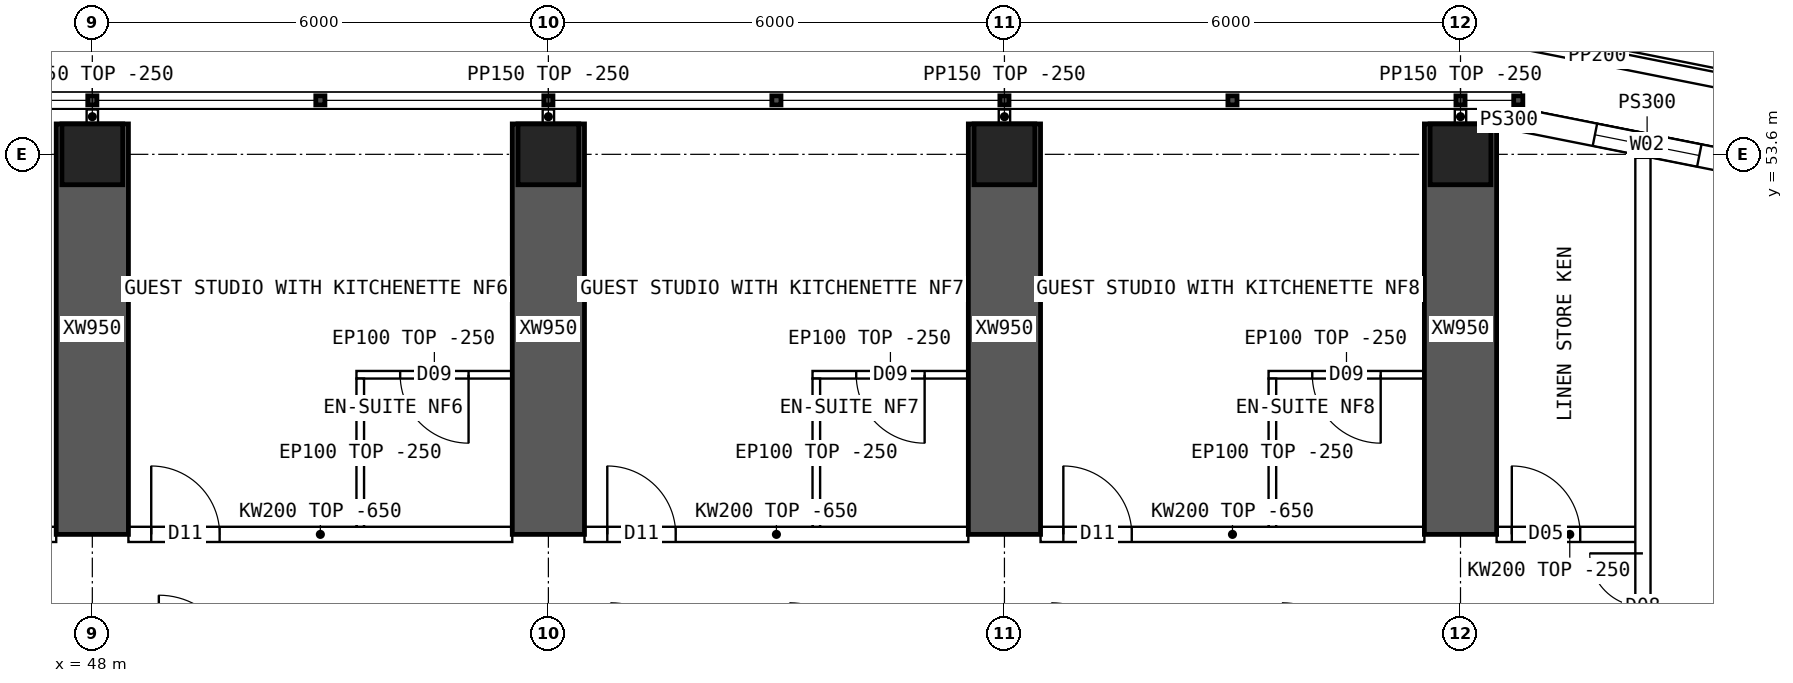
"""IFC4 building model, lengths in metres.
Left out: names, types, materials, properties, quantities, classifications, styles, units other than length and angle.
Written with IfcOpenShell. Run it as: python <this file> out.ifc"""

import sys

from ifc_helpers import new_model, si_unit, direction, frame, frame_2d, origin, origin_2d, place, context, subcontext, project, spatial, polyline, rectangle, hollow_rectangle, outline, extrude, element, fill, save


model = new_model("IFC4")
c1 = context("Model", 3, precision=1e-05, world=origin(), true_north=direction((0.0, 1.0)))
c2 = subcontext(c1, "Body", "Model", "MODEL_VIEW")
j1 = project(units=[si_unit("LENGTHUNIT", "METRE"), si_unit("PLANEANGLEUNIT", "RADIAN")], contexts=[c1])
p1 = place(None, origin())
s1 = spatial("IfcSite", under=j1, at=p1, CompositionType="ELEMENT")
p2 = place(p1, origin())
s2 = spatial("IfcBuilding", under=s1, at=p2, CompositionType="ELEMENT")
p3 = place(p2, frame((0.0, 0.0, 140.35)))
s3 = spatial("IfcBuildingStorey", under=s2, at=p3, CompositionType="ELEMENT", Elevation=140.35)
for number, where, z_axis, x_axis in (
    (1, (48.0, 53.6, 0.0), (0.0, 0.0, 1.0), (1.0, 0.0, 0.0)),
    (2, (54.0, 53.6, 0.0), (0.0, 0.0, 1.0), (1.0, 0.0, 0.0)),
    (3, (60.0, 53.6, 0.0), (0.0, 0.0, 1.0), (1.0, 0.0, 0.0)),
    (4, (66.0, 53.6, 0.0), (0.0, 0.0, 1.0), (1.0, 0.0, 0.0)),
):
    element("IfcColumn", number, at=place(p3, frame(where, z_axis=z_axis, x_axis=x_axis)), inside=s3, PredefinedType="COLUMN", context=c2, shape_type="SweptSolid", body=[
        extrude(hollow_rectangle(XDim=0.8, YDim=0.8, WallThickness=0.08, at=origin_2d()), origin(), (0.0, 0.0, 1.0), 4.5),
    ])
for number, where, z_axis, x_axis in (
    (5, (48.0, 48.6, 0.0), (0.0, 0.0, 1.0), (0.0, 1.0, 0.0)),
    (6, (54.0, 48.6, 0.0), (0.0, 0.0, 1.0), (0.0, 1.0, 0.0)),
    (7, (60.0, 48.6, 0.0), (0.0, 0.0, 1.0), (0.0, 1.0, 0.0)),
    (8, (66.0, 48.6, 0.0), (0.0, 0.0, 1.0), (0.0, 1.0, 0.0)),
):
    element("IfcWall", number, at=place(p3, frame(where, z_axis=z_axis, x_axis=x_axis)), inside=s3, PredefinedType="SHEAR", context=c2, shape_type="SweptSolid", body=[
        extrude(rectangle(XDim=5.4, YDim=0.95, at=frame_2d((2.7, 0.0))), origin(), (0.0, 0.0, 1.0), 4.5),
    ])
p4 = place(p3, frame((70.11, 53.392, 0.0), z_axis=(0.0, 0.0, 1.0), x_axis=(-0.98078325777, 0.195100490205, 0.0)))
e9 = element("IfcWall", 9, at=p4, inside=s3, PredefinedType="SOLIDWALL", context=c2, shape_type="SweptSolid", body=[
    extrude(outline(polyline([(-0.03, -0.15), (3.405, -0.15), (3.345, 0.15), (0.03, 0.15), (-0.03, -0.15)])), origin(), (0.0, 0.0, 1.0), 4.25),
])
p5 = place(p4, frame((0.988, 0.0, 0.9)))
e10 = element("IfcOpeningElement", 10, at=p5, cuts=e9, PredefinedType="OPENING", context=c2, shape_type="SweptSolid", body=[
    extrude(rectangle(XDim=1.4, YDim=1.8, at=frame_2d((0.7, 0.9))), frame((0.0, 0.16, 0.0), z_axis=(0.0, -1.0, 0.0), x_axis=(1.0, 0.0, 0.0)), (0.0, 0.0, 1.0), 0.32),
])
p6 = place(p3, frame((66.8, 54.05, 0.0), z_axis=(0.0, 0.0, 1.0), x_axis=(-1.0, 0.0, 0.0)))
e11 = element("IfcWall", 11, at=p6, inside=s3, PredefinedType="SOLIDWALL", context=c2, shape_type="SweptSolid", body=[
    extrude(rectangle(XDim=0.325, YDim=0.3, at=frame_2d((0.163, 0.0))), origin(), (0.0, 0.0, 1.0), 4.25),
])
p7 = place(p3, frame((65.985, 55.25, 0.0), z_axis=(0.0, 0.0, 1.0), x_axis=(0.980780584923, -0.195113926303, 0.0)))
e12 = element("IfcWall", 12, at=p7, inside=s3, PredefinedType="PARAPET", context=c2, shape_type="SweptSolid", body=[
    extrude(rectangle(XDim=3.701, YDim=0.2, at=frame_2d((1.851, 0.0))), origin(), (0.0, 0.0, 1.0), 1.1),
])
p8 = place(p3, frame((42.475, 48.6, 0.0), z_axis=(0.0, 0.0, 1.0), x_axis=(1.0, 0.0, 0.0)))
e13 = element("IfcWall", 13, at=p8, inside=s3, PredefinedType="SOLIDWALL", context=c2, shape_type="SweptSolid", body=[
    extrude(outline(polyline([(0.0, 0.0), (5.05, 0.0), (5.05, 3.85), (0.0, 3.85), (0.0, 0.0)])), frame((0.0, 0.1, 0.0), z_axis=(0.0, -1.0, 0.0), x_axis=(1.0, 0.0, 0.0)), (0.0, 0.0, 1.0), 0.2),
])
p9 = place(p8, frame((1.0, 0.0, 0.0)))
e14 = element("IfcOpeningElement", 14, at=p9, cuts=e13, PredefinedType="OPENING", context=c2, shape_type="SweptSolid", body=[
    extrude(rectangle(XDim=1.8, YDim=2.1, at=frame_2d((0.9, 1.05))), frame((0.0, 0.11, 0.0), z_axis=(0.0, -1.0, 0.0), x_axis=(1.0, 0.0, 0.0)), (0.0, 0.0, 1.0), 0.22),
])
p10 = place(p3, frame((48.475, 48.6, 0.0), z_axis=(0.0, 0.0, 1.0), x_axis=(1.0, 0.0, 0.0)))
e15 = element("IfcWall", 15, at=p10, inside=s3, PredefinedType="SOLIDWALL", context=c2, shape_type="SweptSolid", body=[
    extrude(outline(polyline([(0.0, 0.0), (5.05, 0.0), (5.05, 3.85), (0.0, 3.85), (0.0, 0.0)])), frame((0.0, 0.1, 0.0), z_axis=(0.0, -1.0, 0.0), x_axis=(1.0, 0.0, 0.0)), (0.0, 0.0, 1.0), 0.2),
])
p11 = place(p10, frame((0.3, 0.0, 0.0)))
e16 = element("IfcOpeningElement", 16, at=p11, cuts=e15, PredefinedType="OPENING", context=c2, shape_type="SweptSolid", body=[
    extrude(rectangle(XDim=0.9, YDim=2.1, at=frame_2d((0.45, 1.05))), frame((0.0, 0.11, 0.0), z_axis=(0.0, -1.0, 0.0), x_axis=(1.0, 0.0, 0.0)), (0.0, 0.0, 1.0), 0.22),
])
p12 = place(p3, frame((54.475, 48.6, 0.0), z_axis=(0.0, 0.0, 1.0), x_axis=(1.0, 0.0, 0.0)))
e17 = element("IfcWall", 17, at=p12, inside=s3, PredefinedType="SOLIDWALL", context=c2, shape_type="SweptSolid", body=[
    extrude(outline(polyline([(0.0, 0.0), (5.05, 0.0), (5.05, 3.85), (0.0, 3.85), (0.0, 0.0)])), frame((0.0, 0.1, 0.0), z_axis=(0.0, -1.0, 0.0), x_axis=(1.0, 0.0, 0.0)), (0.0, 0.0, 1.0), 0.2),
])
p13 = place(p12, frame((0.3, 0.0, 0.0)))
e18 = element("IfcOpeningElement", 18, at=p13, cuts=e17, PredefinedType="OPENING", context=c2, shape_type="SweptSolid", body=[
    extrude(rectangle(XDim=0.9, YDim=2.1, at=frame_2d((0.45, 1.05))), frame((0.0, 0.11, 0.0), z_axis=(0.0, -1.0, 0.0), x_axis=(1.0, 0.0, 0.0)), (0.0, 0.0, 1.0), 0.22),
])
p14 = place(p3, frame((60.475, 48.6, 0.0), z_axis=(0.0, 0.0, 1.0), x_axis=(1.0, 0.0, 0.0)))
e19 = element("IfcWall", 19, at=p14, inside=s3, PredefinedType="SOLIDWALL", context=c2, shape_type="SweptSolid", body=[
    extrude(outline(polyline([(0.0, 0.0), (5.05, 0.0), (5.05, 3.85), (0.0, 3.85), (0.0, 0.0)])), frame((0.0, 0.1, 0.0), z_axis=(0.0, -1.0, 0.0), x_axis=(1.0, 0.0, 0.0)), (0.0, 0.0, 1.0), 0.2),
])
p15 = place(p14, frame((0.3, 0.0, 0.0)))
e20 = element("IfcOpeningElement", 20, at=p15, cuts=e19, PredefinedType="OPENING", context=c2, shape_type="SweptSolid", body=[
    extrude(rectangle(XDim=0.9, YDim=2.1, at=frame_2d((0.45, 1.05))), frame((0.0, 0.11, 0.0), z_axis=(0.0, -1.0, 0.0), x_axis=(1.0, 0.0, 0.0)), (0.0, 0.0, 1.0), 0.22),
])
p16 = place(p3, frame((66.475, 48.6, 0.0), z_axis=(0.0, 0.0, 1.0), x_axis=(1.0, 0.0, 0.0)))
e21 = element("IfcWall", 21, at=p16, inside=s3, PredefinedType="SOLIDWALL", context=c2, shape_type="SweptSolid", body=[
    extrude(rectangle(XDim=1.925, YDim=0.2, at=frame_2d((0.962, 0.0))), origin(), (0.0, 0.0, 1.0), 4.25),
])
p17 = place(p16, frame((0.2, 0.0, 0.0)))
e22 = element("IfcOpeningElement", 22, at=p17, cuts=e21, PredefinedType="OPENING", context=c2, shape_type="SweptSolid", body=[
    extrude(rectangle(XDim=0.9, YDim=2.1, at=frame_2d((0.45, 1.05))), frame((0.0, 0.11, 0.0), z_axis=(0.0, -1.0, 0.0), x_axis=(1.0, 0.0, 0.0)), (0.0, 0.0, 1.0), 0.22),
])
p18 = place(p3, frame((51.475, 50.7, 0.0), z_axis=(0.0, 0.0, 1.0), x_axis=(1.0, 0.0, 0.0)))
e23 = element("IfcWall", 23, at=p18, inside=s3, PredefinedType="PARTITIONING", context=c2, shape_type="SweptSolid", body=[
    extrude(rectangle(XDim=2.05, YDim=0.1, at=frame_2d((1.025, 0.0))), origin(), (0.0, 0.0, 1.0), 4.25),
])
p19 = place(p18, frame((0.575, 0.0, 0.0)))
e24 = element("IfcOpeningElement", 24, at=p19, cuts=e23, PredefinedType="OPENING", context=c2, shape_type="SweptSolid", body=[
    extrude(rectangle(XDim=0.9, YDim=2.1, at=frame_2d((0.45, 1.05))), frame((0.0, 0.06, 0.0), z_axis=(0.0, -1.0, 0.0), x_axis=(1.0, 0.0, 0.0)), (0.0, 0.0, 1.0), 0.12),
])
p20 = place(p3, frame((51.525, 50.65, 0.0), z_axis=(0.0, 0.0, 1.0), x_axis=(0.0, -1.0, 0.0)))
e25 = element("IfcWall", 25, at=p20, inside=s3, PredefinedType="PARTITIONING", context=c2, shape_type="SweptSolid", body=[
    extrude(outline(polyline([(0.0, 0.0), (1.95, 0.0), (1.95, 3.85), (1.902, 3.85), (1.9, 4.25), (0.0, 4.25), (0.0, 0.0)])), frame((0.0, 0.05, 0.0), z_axis=(0.0, -1.0, 0.0), x_axis=(1.0, 0.0, 0.0)), (0.0, 0.0, 1.0), 0.1),
])
p21 = place(p3, frame((57.475, 50.7, 0.0), z_axis=(0.0, 0.0, 1.0), x_axis=(1.0, 0.0, 0.0)))
e26 = element("IfcWall", 26, at=p21, inside=s3, PredefinedType="PARTITIONING", context=c2, shape_type="SweptSolid", body=[
    extrude(rectangle(XDim=2.05, YDim=0.1, at=frame_2d((1.025, 0.0))), origin(), (0.0, 0.0, 1.0), 4.25),
])
p22 = place(p21, frame((0.575, 0.0, 0.0)))
e27 = element("IfcOpeningElement", 27, at=p22, cuts=e26, PredefinedType="OPENING", context=c2, shape_type="SweptSolid", body=[
    extrude(rectangle(XDim=0.9, YDim=2.1, at=frame_2d((0.45, 1.05))), frame((0.0, 0.06, 0.0), z_axis=(0.0, -1.0, 0.0), x_axis=(1.0, 0.0, 0.0)), (0.0, 0.0, 1.0), 0.12),
])
p23 = place(p3, frame((57.525, 50.65, 0.0), z_axis=(0.0, 0.0, 1.0), x_axis=(0.0, -1.0, 0.0)))
e28 = element("IfcWall", 28, at=p23, inside=s3, PredefinedType="PARTITIONING", context=c2, shape_type="SweptSolid", body=[
    extrude(outline(polyline([(0.0, 0.0), (1.95, 0.0), (1.95, 3.85), (1.902, 3.85), (1.9, 4.25), (0.0, 4.25), (0.0, 0.0)])), frame((0.0, 0.05, 0.0), z_axis=(0.0, -1.0, 0.0), x_axis=(1.0, 0.0, 0.0)), (0.0, 0.0, 1.0), 0.1),
])
p24 = place(p3, frame((63.475, 50.7, 0.0), z_axis=(0.0, 0.0, 1.0), x_axis=(1.0, 0.0, 0.0)))
e29 = element("IfcWall", 29, at=p24, inside=s3, PredefinedType="PARTITIONING", context=c2, shape_type="SweptSolid", body=[
    extrude(rectangle(XDim=2.05, YDim=0.1, at=frame_2d((1.025, 0.0))), origin(), (0.0, 0.0, 1.0), 4.25),
])
p25 = place(p24, frame((0.575, 0.0, 0.0)))
e30 = element("IfcOpeningElement", 30, at=p25, cuts=e29, PredefinedType="OPENING", context=c2, shape_type="SweptSolid", body=[
    extrude(rectangle(XDim=0.9, YDim=2.1, at=frame_2d((0.45, 1.05))), frame((0.0, 0.06, 0.0), z_axis=(0.0, -1.0, 0.0), x_axis=(1.0, 0.0, 0.0)), (0.0, 0.0, 1.0), 0.12),
])
p26 = place(p3, frame((63.525, 50.65, 0.0), z_axis=(0.0, 0.0, 1.0), x_axis=(0.0, -1.0, 0.0)))
e31 = element("IfcWall", 31, at=p26, inside=s3, PredefinedType="PARTITIONING", context=c2, shape_type="SweptSolid", body=[
    extrude(outline(polyline([(0.0, 0.0), (1.95, 0.0), (1.95, 3.85), (1.902, 3.85), (1.9, 4.25), (0.0, 4.25), (0.0, 0.0)])), frame((0.0, 0.05, 0.0), z_axis=(0.0, -1.0, 0.0), x_axis=(1.0, 0.0, 0.0)), (0.0, 0.0, 1.0), 0.1),
])
p27 = place(p3, frame((68.4, 10.446, 0.0), z_axis=(0.0, 0.0, 1.0), x_axis=(0.0, 1.0, 0.0)))
e32 = element("IfcWall", 32, at=p27, inside=s3, PredefinedType="SOLIDWALL", context=c2, shape_type="SweptSolid", body=[
    extrude(rectangle(XDim=43.107, YDim=0.2, at=frame_2d((21.554, 0.0))), origin(), (0.0, 0.0, 1.0), 4.25),
])
p28 = place(p27, frame((13.914, 0.0, 0.0)))
e33 = element("IfcOpeningElement", 33, at=p28, cuts=e32, PredefinedType="OPENING", context=c2, shape_type="SweptSolid", body=[
    extrude(rectangle(XDim=1.2, YDim=2.1, at=frame_2d((0.6, 1.05))), frame((0.0, 0.11, 0.0), z_axis=(0.0, -1.0, 0.0), x_axis=(1.0, 0.0, 0.0)), (0.0, 0.0, 1.0), 0.22),
])
p29 = place(p27, frame((27.994, 0.0, 0.0)))
e34 = element("IfcOpeningElement", 34, at=p29, cuts=e32, PredefinedType="OPENING", context=c2, shape_type="SweptSolid", body=[
    extrude(rectangle(XDim=1.2, YDim=2.1, at=frame_2d((0.6, 1.05))), frame((0.0, 0.11, 0.0), z_axis=(0.0, -1.0, 0.0), x_axis=(1.0, 0.0, 0.0)), (0.0, 0.0, 1.0), 0.22),
])
p30 = place(p27, frame((5.104, 0.0, 0.0)))
e35 = element("IfcOpeningElement", 35, at=p30, cuts=e32, PredefinedType="OPENING", context=c2, shape_type="SweptSolid", body=[
    extrude(rectangle(XDim=1.4, YDim=2.1, at=frame_2d((0.7, 1.05))), frame((0.0, 0.11, 0.0), z_axis=(0.0, -1.0, 0.0), x_axis=(1.0, 0.0, 0.0)), (0.0, 0.0, 1.0), 0.22),
])
p31 = place(p27, frame((36.504, 0.0, 0.0)))
e36 = element("IfcOpeningElement", 36, at=p31, cuts=e32, PredefinedType="OPENING", context=c2, shape_type="SweptSolid", body=[
    extrude(rectangle(XDim=1.4, YDim=2.1, at=frame_2d((0.7, 1.05))), frame((0.0, 0.11, 0.0), z_axis=(0.0, -1.0, 0.0), x_axis=(1.0, 0.0, 0.0)), (0.0, 0.0, 1.0), 0.22),
])
for number, where, z_axis, x_axis in (
    (37, (48.0, 54.0, 0.0), (0.0, 0.0, 1.0), (0.0, 1.0, 0.0)),
    (38, (54.0, 54.0, 0.0), (0.0, 0.0, 1.0), (0.0, 1.0, 0.0)),
    (39, (60.0, 54.0, 0.0), (0.0, 0.0, 1.0), (0.0, 1.0, 0.0)),
    (40, (66.0, 54.0, 0.0), (0.0, 0.0, 1.0), (0.0, 1.0, 0.0)),
):
    element("IfcWall", number, at=place(p3, frame(where, z_axis=z_axis, x_axis=x_axis)), inside=s3, PredefinedType="PARTITIONING", context=c2, shape_type="SweptSolid", body=[
        extrude(rectangle(XDim=0.19, YDim=0.15, at=frame_2d((0.095, 0.0))), origin(), (0.0, 0.0, 1.0), 4.25),
    ])
p32 = place(p5, origin())
e41 = element("IfcWindow", 41, at=p32, inside=s3, PartitioningType="SINGLE_PANEL", PredefinedType="WINDOW", context=c2, shape_type="SweptSolid", body=[
    extrude(rectangle(XDim=1.4, YDim=1.8, at=frame_2d((0.7, 0.9))), frame((0.0, 0.03, 0.0), z_axis=(0.0, -1.0, 0.0), x_axis=(1.0, 0.0, 0.0)), (0.0, 0.0, 1.0), 0.06),
])
fill(e10, e41)
p33 = place(p19, origin())
e42 = element("IfcDoor", 42, at=p33, inside=s3, OperationType="SINGLE_SWING_RIGHT", PredefinedType="DOOR", context=c2, shape_type="SweptSolid", body=[
    extrude(rectangle(XDim=0.9, YDim=2.1, at=frame_2d((0.45, 1.05))), frame((0.0, 0.025, 0.0), z_axis=(0.0, -1.0, 0.0), x_axis=(1.0, 0.0, 0.0)), (0.0, 0.0, 1.0), 0.05),
])
fill(e24, e42)
p34 = place(p11, origin())
e43 = element("IfcDoor", 43, at=p34, inside=s3, OperationType="SINGLE_SWING_LEFT", PredefinedType="DOOR", context=c2, shape_type="SweptSolid", body=[
    extrude(rectangle(XDim=0.9, YDim=2.1, at=frame_2d((0.45, 1.05))), frame((0.0, 0.025, 0.0), z_axis=(0.0, -1.0, 0.0), x_axis=(1.0, 0.0, 0.0)), (0.0, 0.0, 1.0), 0.05),
])
fill(e16, e43)
p35 = place(p22, origin())
e44 = element("IfcDoor", 44, at=p35, inside=s3, OperationType="SINGLE_SWING_RIGHT", PredefinedType="DOOR", context=c2, shape_type="SweptSolid", body=[
    extrude(rectangle(XDim=0.9, YDim=2.1, at=frame_2d((0.45, 1.05))), frame((0.0, 0.025, 0.0), z_axis=(0.0, -1.0, 0.0), x_axis=(1.0, 0.0, 0.0)), (0.0, 0.0, 1.0), 0.05),
])
fill(e27, e44)
p36 = place(p13, origin())
e45 = element("IfcDoor", 45, at=p36, inside=s3, OperationType="SINGLE_SWING_LEFT", PredefinedType="DOOR", context=c2, shape_type="SweptSolid", body=[
    extrude(rectangle(XDim=0.9, YDim=2.1, at=frame_2d((0.45, 1.05))), frame((0.0, 0.025, 0.0), z_axis=(0.0, -1.0, 0.0), x_axis=(1.0, 0.0, 0.0)), (0.0, 0.0, 1.0), 0.05),
])
fill(e18, e45)
p37 = place(p25, origin())
e46 = element("IfcDoor", 46, at=p37, inside=s3, OperationType="SINGLE_SWING_RIGHT", PredefinedType="DOOR", context=c2, shape_type="SweptSolid", body=[
    extrude(rectangle(XDim=0.9, YDim=2.1, at=frame_2d((0.45, 1.05))), frame((0.0, 0.025, 0.0), z_axis=(0.0, -1.0, 0.0), x_axis=(1.0, 0.0, 0.0)), (0.0, 0.0, 1.0), 0.05),
])
fill(e30, e46)
p38 = place(p15, origin())
e47 = element("IfcDoor", 47, at=p38, inside=s3, OperationType="SINGLE_SWING_LEFT", PredefinedType="DOOR", context=c2, shape_type="SweptSolid", body=[
    extrude(rectangle(XDim=0.9, YDim=2.1, at=frame_2d((0.45, 1.05))), frame((0.0, 0.025, 0.0), z_axis=(0.0, -1.0, 0.0), x_axis=(1.0, 0.0, 0.0)), (0.0, 0.0, 1.0), 0.05),
])
fill(e20, e47)
p39 = place(p31, origin())
e48 = element("IfcDoor", 48, at=p39, inside=s3, OperationType="DOUBLE_DOOR_SINGLE_SWING", PredefinedType="DOOR", context=c2, shape_type="SweptSolid", body=[
    extrude(rectangle(XDim=1.4, YDim=2.1, at=frame_2d((0.7, 1.05))), frame((0.0, 0.025, 0.0), z_axis=(0.0, -1.0, 0.0), x_axis=(1.0, 0.0, 0.0)), (0.0, 0.0, 1.0), 0.05),
])
fill(e36, e48)
p40 = place(p17, origin())
e49 = element("IfcDoor", 49, at=p40, inside=s3, OperationType="SINGLE_SWING_LEFT", PredefinedType="DOOR", context=c2, shape_type="SweptSolid", body=[
    extrude(rectangle(XDim=0.9, YDim=2.1, at=frame_2d((0.45, 1.05))), frame((0.0, 0.025, 0.0), z_axis=(0.0, -1.0, 0.0), x_axis=(1.0, 0.0, 0.0)), (0.0, 0.0, 1.0), 0.05),
])
fill(e22, e49)
save(model, sys.argv[1])
